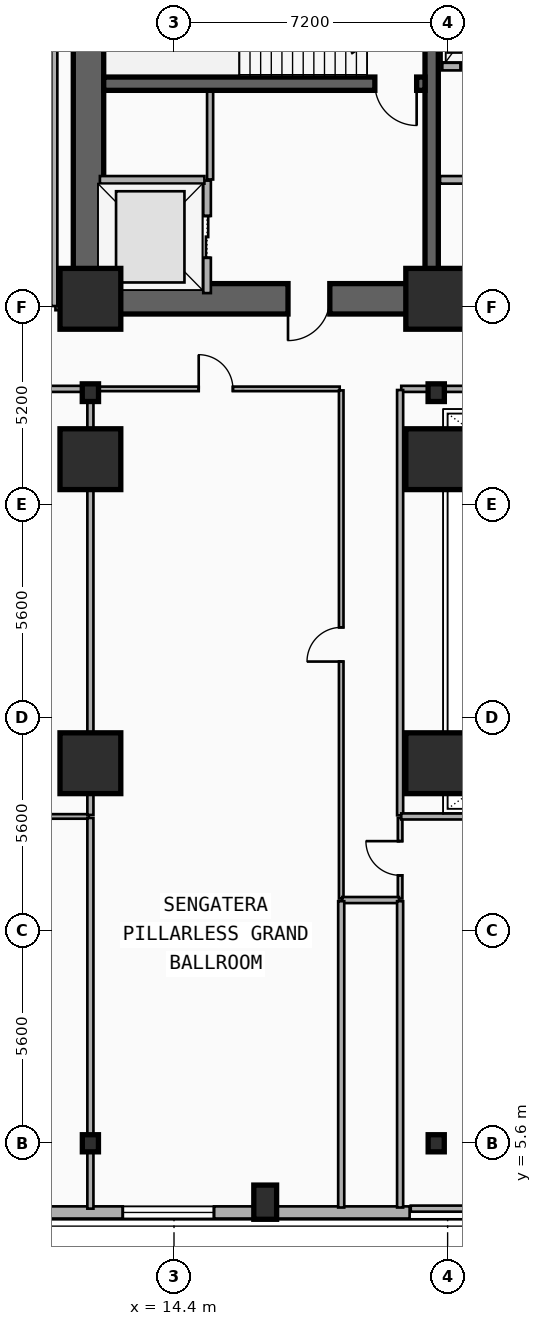
"""IFC4 building model, lengths in metres.
Left out: names, types, materials, properties, quantities, classifications, styles, units other than length and angle.
Written with IfcOpenShell. Run it as: python <this file> out.ifc"""

import sys

from ifc_helpers import new_model, si_unit, direction, frame, frame_2d, origin, origin_2d, place, context, subcontext, project, spatial, rectangle, i_section, extrude, element, fill, save


model = new_model("IFC4")
c1 = context("Model", 3, precision=1e-05, world=origin(), true_north=direction((0.0, 1.0)))
c2 = subcontext(c1, "Body", "Model", "MODEL_VIEW")
j1 = project(units=[si_unit("LENGTHUNIT", "METRE"), si_unit("PLANEANGLEUNIT", "RADIAN")], contexts=[c1])
p1 = place(None, origin())
s1 = spatial("IfcSite", under=j1, at=p1, CompositionType="ELEMENT")
p2 = place(p1, origin())
s2 = spatial("IfcBuilding", under=s1, at=p2, CompositionType="ELEMENT")
p3 = place(p2, frame((0.0, 0.0, 19.4)))
s3 = spatial("IfcBuildingStorey", under=s2, at=p3, CompositionType="ELEMENT", Elevation=19.4)
p4 = place(p3, frame((21.18, 27.82, 0.0), z_axis=(0.0, 0.0, 1.0), x_axis=(-1.0, 0.0, 0.0)))
e1 = element("IfcWall", 1, at=p4, inside=s3, PredefinedType="SHEAR", context=c2, shape_type="SweptSolid", body=[
    extrude(rectangle(XDim=9.03, YDim=0.8, at=frame_2d((4.515, 0.0))), origin(), (0.0, 0.0, 1.0), 4.8),
])
p5 = place(p4, frame((2.68, 0.0, 0.0)))
e2 = element("IfcOpeningElement", 2, at=p5, cuts=e1, PredefinedType="OPENING", context=c2, shape_type="SweptSolid", body=[
    extrude(rectangle(XDim=1.1, YDim=2.15, at=frame_2d((0.55, 1.075))), frame((0.0, 0.41, 0.0), z_axis=(0.0, -1.0, 0.0), x_axis=(1.0, 0.0, 0.0)), (0.0, 0.0, 1.0), 0.82),
])
p6 = place(p3, frame((33.15, 27.82, 0.0), z_axis=(0.0, 0.0, 1.0), x_axis=(-1.0, 0.0, 0.0)))
e3 = element("IfcWall", 3, at=p6, inside=s3, PredefinedType="SHEAR", context=c2, shape_type="SweptSolid", body=[
    extrude(rectangle(XDim=11.97, YDim=0.8, at=frame_2d((5.985, 0.0))), origin(), (0.0, 0.0, 1.0), 4.8),
])
p7 = place(p6, frame((6.1, 0.0, 0.0)))
e4 = element("IfcOpeningElement", 4, at=p7, cuts=e3, PredefinedType="OPENING", context=c2, shape_type="SweptSolid", body=[
    extrude(rectangle(XDim=1.6, YDim=2.2, at=frame_2d((0.8, 1.1))), frame((0.0, 0.41, 0.0), z_axis=(0.0, -1.0, 0.0), x_axis=(1.0, 0.0, 0.0)), (0.0, 0.0, 1.0), 0.82),
])
p8 = place(p3, frame((12.15, 28.22, 0.0), z_axis=(0.0, 0.0, 1.0), x_axis=(0.0, 1.0, 0.0)))
e5 = element("IfcWall", 5, at=p8, inside=s3, PredefinedType="SHEAR", context=c2, shape_type="SweptSolid", body=[
    extrude(rectangle(XDim=8.43, YDim=0.8, at=frame_2d((4.215, 0.0))), origin(), (0.0, 0.0, 1.0), 4.8),
])
p9 = place(p3, frame((21.18, 28.22, 0.0), z_axis=(0.0, 0.0, 1.0), x_axis=(0.0, 1.0, 0.0)))
e6 = element("IfcWall", 6, at=p9, inside=s3, PredefinedType="SHEAR", context=c2, shape_type="SweptSolid", body=[
    extrude(rectangle(XDim=8.43, YDim=0.35, at=frame_2d((4.215, 0.0))), origin(), (0.0, 0.0, 1.0), 4.8),
])
p10 = place(p3, frame((21.005, 33.48, 0.0), z_axis=(0.0, 0.0, 1.0), x_axis=(-1.0, 0.0, 0.0)))
e7 = element("IfcWall", 7, at=p10, inside=s3, PredefinedType="SHEAR", context=c2, shape_type="SweptSolid", body=[
    extrude(rectangle(XDim=8.455, YDim=0.35, at=frame_2d((4.228, 0.0))), origin(), (0.0, 0.0, 1.0), 4.8),
])
p11 = place(p10, frame((0.22, 0.0, 0.0)))
e8 = element("IfcOpeningElement", 8, at=p11, cuts=e7, PredefinedType="OPENING", context=c2, shape_type="SweptSolid", body=[
    extrude(rectangle(XDim=1.1, YDim=2.15, at=frame_2d((0.55, 1.075))), frame((0.0, 0.185, 0.0), z_axis=(0.0, -1.0, 0.0), x_axis=(1.0, 0.0, 0.0)), (0.0, 0.0, 1.0), 0.37),
])
for number, where, z_axis, x_axis in (
    (9, (12.2, 27.82, 0.0), (0.0, 0.0, 1.0), (1.0, 0.0, 0.0)),
    (10, (21.3, 27.82, 0.0), (0.0, 0.0, 1.0), (1.0, 0.0, 0.0)),
):
    element("IfcColumn", number, at=place(p3, frame(where, z_axis=z_axis, x_axis=x_axis)), inside=s3, PredefinedType="COLUMN", context=c2, shape_type="SweptSolid", body=[
        extrude(rectangle(XDim=1.6, YDim=1.6, at=origin_2d()), origin(), (0.0, 0.0, 1.0), 4.8),
    ])
for number, where, z_axis, x_axis in (
    (11, (12.2, 25.35, 0.0), (0.0, 0.0, 1.0), (1.0, 0.0, 0.0)),
    (12, (21.3, 25.35, 0.0), (0.0, 0.0, 1.0), (1.0, 0.0, 0.0)),
):
    element("IfcColumn", number, at=place(p3, frame(where, z_axis=z_axis, x_axis=x_axis)), inside=s3, PredefinedType="COLUMN", context=c2, shape_type="SweptSolid", body=[
        extrude(i_section(OverallWidth=0.428, OverallDepth=0.465, WebThickness=0.045, FlangeThickness=0.073, FilletRadius=0.015, at=origin_2d()), origin(), (0.0, 0.0, 1.0), 4.8),
    ])
p12 = place(p3, frame((12.2, 5.6, 0.0), z_axis=(0.0, 0.0, 1.0), x_axis=(1.0, 0.0, 0.0)))
e13 = element("IfcColumn", 13, at=p12, inside=s3, PredefinedType="COLUMN", context=c2, shape_type="SweptSolid", body=[
    extrude(i_section(OverallWidth=0.424, OverallDepth=0.45, WebThickness=0.041, FlangeThickness=0.065, FilletRadius=0.015, at=origin_2d()), origin(), (0.0, 0.0, 1.0), 4.8),
])
for number, where, z_axis, x_axis in (
    (14, (12.2, 15.6, 0.0), (0.0, 0.0, 1.0), (1.0, 0.0, 0.0)),
    (15, (12.2, 23.6, 0.0), (0.0, 0.0, 1.0), (1.0, 0.0, 0.0)),
):
    element("IfcColumn", number, at=place(p3, frame(where, z_axis=z_axis, x_axis=x_axis)), inside=s3, PredefinedType="COLUMN", context=c2, shape_type="SweptSolid", body=[
        extrude(rectangle(XDim=1.6, YDim=1.6, at=origin_2d()), origin(), (0.0, 0.0, 1.0), 4.8),
    ])
p13 = place(p3, frame((21.3, 5.6, 0.0), z_axis=(0.0, 0.0, 1.0), x_axis=(1.0, 0.0, 0.0)))
e16 = element("IfcColumn", 16, at=p13, inside=s3, PredefinedType="COLUMN", context=c2, shape_type="SweptSolid", body=[
    extrude(i_section(OverallWidth=0.424, OverallDepth=0.45, WebThickness=0.041, FlangeThickness=0.065, FilletRadius=0.015, at=origin_2d()), origin(), (0.0, 0.0, 1.0), 4.8),
])
for number, where, z_axis, x_axis in (
    (17, (21.3, 15.6, 0.0), (0.0, 0.0, 1.0), (1.0, 0.0, 0.0)),
    (18, (21.3, 23.6, 0.0), (0.0, 0.0, 1.0), (1.0, 0.0, 0.0)),
):
    element("IfcColumn", number, at=place(p3, frame(where, z_axis=z_axis, x_axis=x_axis)), inside=s3, PredefinedType="COLUMN", context=c2, shape_type="SweptSolid", body=[
        extrude(rectangle(XDim=1.6, YDim=1.6, at=origin_2d()), origin(), (0.0, 0.0, 1.0), 4.8),
    ])
p14 = place(p3, frame((16.8, 4.05, 0.0), z_axis=(0.0, 0.0, 1.0), x_axis=(1.0, 0.0, 0.0)))
e19 = element("IfcColumn", 19, at=p14, inside=s3, PredefinedType="PILASTER", context=c2, shape_type="SweptSolid", body=[
    extrude(rectangle(XDim=0.6, YDim=0.9, at=origin_2d()), origin(), (0.0, 0.0, 1.0), 4.8),
])
p15 = place(p3, frame((20.6, 3.78, 0.0), z_axis=(0.0, 0.0, 1.0), x_axis=(-1.0, 0.0, 0.0)))
e20 = element("IfcWall", 20, at=p15, inside=s3, PredefinedType="SOLIDWALL", context=c2, shape_type="SweptSolid", body=[
    extrude(rectangle(XDim=17.0, YDim=0.32, at=frame_2d((8.5, 0.0))), origin(), (0.0, 0.0, 1.0), 4.5),
])
p16 = place(p15, frame((13.338, 0.0, 0.9)))
e21 = element("IfcOpeningElement", 21, at=p16, cuts=e20, PredefinedType="OPENING", context=c2, shape_type="SweptSolid", body=[
    extrude(rectangle(XDim=2.4, YDim=1.8, at=frame_2d((1.2, 0.9))), frame((0.0, 0.17, 0.0), z_axis=(0.0, -1.0, 0.0), x_axis=(1.0, 0.0, 0.0)), (0.0, 0.0, 1.0), 0.34),
])
p17 = place(p15, frame((5.148, 0.0, 0.9)))
e22 = element("IfcOpeningElement", 22, at=p17, cuts=e20, PredefinedType="OPENING", context=c2, shape_type="SweptSolid", body=[
    extrude(rectangle(XDim=2.4, YDim=1.8, at=frame_2d((1.2, 0.9))), frame((0.0, 0.17, 0.0), z_axis=(0.0, -1.0, 0.0), x_axis=(1.0, 0.0, 0.0)), (0.0, 0.0, 1.0), 0.34),
])
p18 = place(p3, frame((15.27, 27.97, 0.0), z_axis=(0.0, 0.0, 1.0), x_axis=(0.0, 1.0, 0.0)))
e23 = element("IfcWall", 23, at=p18, inside=s3, PredefinedType="PARTITIONING", context=c2, shape_type="SweptSolid", body=[
    extrude(rectangle(XDim=2.96, YDim=0.2, at=frame_2d((1.48, 0.0))), origin(), (0.0, 0.0, 1.0), 3.472),
])
p19 = place(p18, frame((0.93, 0.0, 0.0)))
e24 = element("IfcOpeningElement", 24, at=p19, cuts=e23, PredefinedType="OPENING", context=c2, shape_type="SweptSolid", body=[
    extrude(rectangle(XDim=1.1, YDim=2.15, at=frame_2d((0.55, 1.075))), frame((0.0, 0.11, 0.0), z_axis=(0.0, -1.0, 0.0), x_axis=(1.0, 0.0, 0.0)), (0.0, 0.0, 1.0), 0.22),
])
p20 = place(p3, frame((12.45, 30.95, 0.0), z_axis=(0.0, 0.0, 1.0), x_axis=(1.0, 0.0, 0.0)))
e25 = element("IfcWall", 25, at=p20, inside=s3, PredefinedType="PARTITIONING", context=c2, shape_type="SweptSolid", body=[
    extrude(rectangle(XDim=2.75, YDim=0.2, at=frame_2d((1.375, 0.0))), origin(), (0.0, 0.0, 1.0), 3.472),
])
p21 = place(p3, frame((21.46, 33.93, 0.0), z_axis=(0.0, 0.0, 1.0), x_axis=(1.0, 0.0, 0.0)))
e26 = element("IfcWall", 26, at=p21, inside=s3, PredefinedType="PARTITIONING", context=c2, shape_type="SweptSolid", body=[
    extrude(rectangle(XDim=2.065, YDim=0.2, at=frame_2d((1.032, 0.0))), origin(), (0.0, 0.0, 1.0), 3.472),
])
p22 = place(p21, frame((0.482, 0.0, 0.0)))
e27 = element("IfcOpeningElement", 27, at=p22, cuts=e26, PredefinedType="OPENING", context=c2, shape_type="SweptSolid", body=[
    extrude(rectangle(XDim=1.1, YDim=2.15, at=frame_2d((0.55, 1.075))), frame((0.0, 0.11, 0.0), z_axis=(0.0, -1.0, 0.0), x_axis=(1.0, 0.0, 0.0)), (0.0, 0.0, 1.0), 0.22),
])
p23 = place(p3, frame((21.4, 30.95, 0.0), z_axis=(0.0, 0.0, 1.0), x_axis=(1.0, 0.0, 0.0)))
e28 = element("IfcWall", 28, at=p23, inside=s3, PredefinedType="PARTITIONING", context=c2, shape_type="SweptSolid", body=[
    extrude(rectangle(XDim=3.46, YDim=0.2, at=frame_2d((1.73, 0.0))), origin(), (0.0, 0.0, 1.0), 3.472),
])
p24 = place(p23, frame((1.13, 0.0, 0.0)))
e29 = element("IfcOpeningElement", 29, at=p24, cuts=e28, PredefinedType="OPENING", context=c2, shape_type="SweptSolid", body=[
    extrude(rectangle(XDim=1.2, YDim=2.15, at=frame_2d((0.6, 1.075))), frame((0.0, 0.11, 0.0), z_axis=(0.0, -1.0, 0.0), x_axis=(1.0, 0.0, 0.0)), (0.0, 0.0, 1.0), 0.22),
])
p25 = place(p3, frame((0.28, 25.45, 0.0), z_axis=(0.0, 0.0, 1.0), x_axis=(1.0, 0.0, 0.0)))
e30 = element("IfcWall", 30, at=p25, inside=s3, PredefinedType="PARTITIONING", context=c2, shape_type="SweptSolid", body=[
    extrude(rectangle(XDim=11.88, YDim=0.16, at=frame_2d((5.94, 0.0))), origin(), (0.0, 0.0, 1.0), 3.666),
])
p26 = place(p25, frame((0.557, 0.0, 0.0)))
e31 = element("IfcOpeningElement", 31, at=p26, cuts=e30, PredefinedType="OPENING", context=c2, shape_type="SweptSolid", body=[
    extrude(rectangle(XDim=1.6, YDim=2.2, at=frame_2d((0.8, 1.1))), frame((0.0, 0.09, 0.0), z_axis=(0.0, -1.0, 0.0), x_axis=(1.0, 0.0, 0.0)), (0.0, 0.0, 1.0), 0.18),
])
p27 = place(p3, frame((12.24, 25.45, 0.0), z_axis=(0.0, 0.0, 1.0), x_axis=(1.0, 0.0, 0.0)))
e32 = element("IfcWall", 32, at=p27, inside=s3, PredefinedType="PARTITIONING", context=c2, shape_type="SweptSolid", body=[
    extrude(rectangle(XDim=6.52, YDim=0.12, at=frame_2d((3.26, 0.0))), origin(), (0.0, 0.0, 1.0), 3.666),
])
p28 = place(p27, frame((2.81, 0.0, 0.0)))
e33 = element("IfcOpeningElement", 33, at=p28, cuts=e32, PredefinedType="OPENING", context=c2, shape_type="SweptSolid", body=[
    extrude(rectangle(XDim=0.9, YDim=2.1, at=frame_2d((0.45, 1.05))), frame((0.0, 0.07, 0.0), z_axis=(0.0, -1.0, 0.0), x_axis=(1.0, 0.0, 0.0)), (0.0, 0.0, 1.0), 0.14),
])
p29 = place(p3, frame((18.8, 12.04, 0.0), z_axis=(0.0, 0.0, 1.0), x_axis=(0.0, 1.0, 0.0)))
e34 = element("IfcWall", 34, at=p29, inside=s3, PredefinedType="PARTITIONING", context=c2, shape_type="SweptSolid", body=[
    extrude(rectangle(XDim=13.37, YDim=0.12, at=frame_2d((6.685, 0.0))), origin(), (0.0, 0.0, 1.0), 3.472),
])
p30 = place(p29, frame((6.235, 0.0, 0.0)))
e35 = element("IfcOpeningElement", 35, at=p30, cuts=e34, PredefinedType="OPENING", context=c2, shape_type="SweptSolid", body=[
    extrude(rectangle(XDim=0.9, YDim=2.1, at=frame_2d((0.45, 1.05))), frame((0.0, 0.07, 0.0), z_axis=(0.0, -1.0, 0.0), x_axis=(1.0, 0.0, 0.0)), (0.0, 0.0, 1.0), 0.14),
])
p31 = place(p3, frame((20.35, 12.04, 0.0), z_axis=(0.0, 0.0, 1.0), x_axis=(0.0, 1.0, 0.0)))
e36 = element("IfcWall", 36, at=p31, inside=s3, PredefinedType="PARTITIONING", context=c2, shape_type="SweptSolid", body=[
    extrude(rectangle(XDim=2.12, YDim=0.12, at=frame_2d((1.06, 0.0))), origin(), (0.0, 0.0, 1.0), 4.12),
])
p32 = place(p31, frame((0.61, 0.0, 0.0)))
e37 = element("IfcOpeningElement", 37, at=p32, cuts=e36, PredefinedType="OPENING", context=c2, shape_type="SweptSolid", body=[
    extrude(rectangle(XDim=0.9, YDim=2.1, at=frame_2d((0.45, 1.05))), frame((0.0, 0.07, 0.0), z_axis=(0.0, -1.0, 0.0), x_axis=(1.0, 0.0, 0.0)), (0.0, 0.0, 1.0), 0.14),
])
p33 = place(p3, frame((0.28, 14.2, 0.0), z_axis=(0.0, 0.0, 1.0), x_axis=(1.0, 0.0, 0.0)))
e38 = element("IfcWall", 38, at=p33, inside=s3, PredefinedType="PARTITIONING", context=c2, shape_type="SweptSolid", body=[
    extrude(rectangle(XDim=11.88, YDim=0.12, at=frame_2d((5.94, 0.0))), origin(), (0.0, 0.0, 1.0), 3.666),
])
p34 = place(p33, frame((5.49, 0.0, 0.0)))
e39 = element("IfcOpeningElement", 39, at=p34, cuts=e38, PredefinedType="OPENING", context=c2, shape_type="SweptSolid", body=[
    extrude(rectangle(XDim=0.9, YDim=2.1, at=frame_2d((0.45, 1.05))), frame((0.0, 0.07, 0.0), z_axis=(0.0, -1.0, 0.0), x_axis=(1.0, 0.0, 0.0)), (0.0, 0.0, 1.0), 0.14),
])
p35 = place(p3, frame((12.2, 3.88, 0.0), z_axis=(0.0, 0.0, 1.0), x_axis=(0.0, 1.0, 0.0)))
e40 = element("IfcWall", 40, at=p35, inside=s3, PredefinedType="PARTITIONING", context=c2, shape_type="SweptSolid", body=[
    extrude(rectangle(XDim=10.28, YDim=0.16, at=frame_2d((5.14, 0.0))), origin(), (0.0, 0.0, 1.0), 3.666),
])
p36 = place(p3, frame((12.2, 14.24, 0.0), z_axis=(0.0, 0.0, 1.0), x_axis=(0.0, 1.0, 0.0)))
e41 = element("IfcWall", 41, at=p36, inside=s3, PredefinedType="PARTITIONING", context=c2, shape_type="SweptSolid", body=[
    extrude(rectangle(XDim=11.17, YDim=0.16, at=frame_2d((5.585, 0.0))), origin(), (0.0, 0.0, 1.0), 3.472),
])
p37 = place(p3, frame((15.35, 30.96, 0.0), z_axis=(0.0, 0.0, 1.0), x_axis=(0.0, 1.0, 0.0)))
e42 = element("IfcWall", 42, at=p37, inside=s3, PredefinedType="PARTITIONING", context=c2, shape_type="SweptSolid", body=[
    extrude(rectangle(XDim=2.31, YDim=0.16, at=frame_2d((1.155, 0.0))), origin(), (0.0, 0.0, 1.0), 4.5),
])
p38 = place(p3, frame((20.38, 25.45, 0.0), z_axis=(0.0, 0.0, 1.0), x_axis=(1.0, 0.0, 0.0)))
e43 = element("IfcWall", 43, at=p38, inside=s3, PredefinedType="PARTITIONING", context=c2, shape_type="SweptSolid", body=[
    extrude(rectangle(XDim=15.94, YDim=0.16, at=frame_2d((7.97, 0.0))), origin(), (0.0, 0.0, 1.0), 3.666),
])
p39 = place(p3, frame((11.28, 27.6, 0.0), z_axis=(0.0, 0.0, 1.0), x_axis=(1.0, 0.0, 0.0)))
e44 = element("IfcWall", 44, at=p39, inside=s3, PredefinedType="PARTITIONING", context=c2, shape_type="SweptSolid", body=[
    extrude(rectangle(XDim=0.84, YDim=0.16, at=frame_2d((0.42, 0.0))), origin(), (0.0, 0.0, 1.0), 3.472),
])
p40 = place(p3, frame((11.25, 27.63, 0.0), z_axis=(0.0, 0.0, 1.0), x_axis=(0.0, 1.0, 0.0)))
e45 = element("IfcWall", 45, at=p40, inside=s3, PredefinedType="PARTITIONING", context=c2, shape_type="SweptSolid", body=[
    extrude(rectangle(XDim=10.29, YDim=0.16, at=frame_2d((5.145, 0.0))), origin(), (0.0, 0.0, 1.0), 4.5),
])
p41 = place(p3, frame((18.83, 12.0, 0.0), z_axis=(0.0, 0.0, 1.0), x_axis=(1.0, 0.0, 0.0)))
e46 = element("IfcWall", 46, at=p41, inside=s3, PredefinedType="PARTITIONING", context=c2, shape_type="SweptSolid", body=[
    extrude(rectangle(XDim=1.49, YDim=0.16, at=frame_2d((0.745, 0.0))), origin(), (0.0, 0.0, 1.0), 4.12),
])
p42 = place(p3, frame((20.35, 14.23, 0.0), z_axis=(0.0, 0.0, 1.0), x_axis=(0.0, 1.0, 0.0)))
e47 = element("IfcWall", 47, at=p42, inside=s3, PredefinedType="PARTITIONING", context=c2, shape_type="SweptSolid", body=[
    extrude(rectangle(XDim=11.19, YDim=0.16, at=frame_2d((5.595, 0.0))), origin(), (0.0, 0.0, 1.0), 3.472),
])
p43 = place(p3, frame((18.8, 3.91, 0.0), z_axis=(0.0, 0.0, 1.0), x_axis=(0.0, 1.0, 0.0)))
e48 = element("IfcWall", 48, at=p43, inside=s3, PredefinedType="PARTITIONING", context=c2, shape_type="SweptSolid", body=[
    extrude(rectangle(XDim=8.06, YDim=0.16, at=frame_2d((4.03, 0.0))), origin(), (0.0, 0.0, 1.0), 3.83),
])
p44 = place(p3, frame((20.63, 3.88, 0.0), z_axis=(0.0, 0.0, 1.0), x_axis=(1.0, 0.0, 0.0)))
e49 = element("IfcWall", 49, at=p44, inside=s3, PredefinedType="PARTITIONING", context=c2, shape_type="SweptSolid", body=[
    extrude(rectangle(XDim=1.44, YDim=0.16, at=frame_2d((0.72, 0.0))), origin(), (0.0, 0.0, 1.0), 4.5),
])
p45 = place(p3, frame((20.38, 14.2, 0.0), z_axis=(0.0, 0.0, 1.0), x_axis=(1.0, 0.0, 0.0)))
e50 = element("IfcWall", 50, at=p45, inside=s3, PredefinedType="PARTITIONING", context=c2, shape_type="SweptSolid", body=[
    extrude(rectangle(XDim=15.94, YDim=0.16, at=frame_2d((7.97, 0.0))), origin(), (0.0, 0.0, 1.0), 3.666),
])
p46 = place(p3, frame((20.35, 3.91, 0.0), z_axis=(0.0, 0.0, 1.0), x_axis=(0.0, 1.0, 0.0)))
e51 = element("IfcWall", 51, at=p46, inside=s3, PredefinedType="PARTITIONING", context=c2, shape_type="SweptSolid", body=[
    extrude(rectangle(XDim=8.06, YDim=0.16, at=frame_2d((4.03, 0.0))), origin(), (0.0, 0.0, 1.0), 3.83),
])
p47 = place(p17, origin())
e52 = element("IfcWindow", 52, at=p47, inside=s3, PartitioningType="SINGLE_PANEL", PredefinedType="WINDOW", context=c2, shape_type="SweptSolid", body=[
    extrude(rectangle(XDim=2.4, YDim=1.8, at=frame_2d((1.2, 0.9))), frame((0.0, 0.03, 0.0), z_axis=(0.0, -1.0, 0.0), x_axis=(1.0, 0.0, 0.0)), (0.0, 0.0, 1.0), 0.06),
])
fill(e22, e52)
p48 = place(p19, origin())
e53 = element("IfcDoor", 53, at=p48, inside=s3, OperationType="DOUBLE_DOOR_SLIDING", PredefinedType="DOOR", context=c2, shape_type="SweptSolid", body=[
    extrude(rectangle(XDim=1.1, YDim=2.15, at=frame_2d((0.55, 1.075))), frame((0.0, 0.025, 0.0), z_axis=(0.0, -1.0, 0.0), x_axis=(1.0, 0.0, 0.0)), (0.0, 0.0, 1.0), 0.05),
])
fill(e24, e53)
p49 = place(p22, origin())
e54 = element("IfcDoor", 54, at=p49, inside=s3, OperationType="DOUBLE_DOOR_SLIDING", PredefinedType="DOOR", context=c2, shape_type="SweptSolid", body=[
    extrude(rectangle(XDim=1.1, YDim=2.15, at=frame_2d((0.55, 1.075))), frame((0.0, 0.025, 0.0), z_axis=(0.0, -1.0, 0.0), x_axis=(1.0, 0.0, 0.0)), (0.0, 0.0, 1.0), 0.05),
])
fill(e27, e54)
p50 = place(p11, origin())
e55 = element("IfcDoor", 55, at=p50, inside=s3, OperationType="SINGLE_SWING_LEFT", PredefinedType="DOOR", context=c2, shape_type="SweptSolid", body=[
    extrude(rectangle(XDim=1.1, YDim=2.15, at=frame_2d((0.55, 1.075))), frame((0.0, 0.025, 0.0), z_axis=(0.0, -1.0, 0.0), x_axis=(1.0, 0.0, 0.0)), (0.0, 0.0, 1.0), 0.05),
])
fill(e8, e55)
p51 = place(p5, origin())
e56 = element("IfcDoor", 56, at=p51, inside=s3, OperationType="SINGLE_SWING_RIGHT", PredefinedType="DOOR", context=c2, shape_type="SweptSolid", body=[
    extrude(rectangle(XDim=1.1, YDim=2.15, at=frame_2d((0.55, 1.075))), frame((0.0, 0.025, 0.0), z_axis=(0.0, -1.0, 0.0), x_axis=(1.0, 0.0, 0.0)), (0.0, 0.0, 1.0), 0.05),
])
fill(e2, e56)
p52 = place(p28, origin())
e57 = element("IfcDoor", 57, at=p52, inside=s3, OperationType="SINGLE_SWING_LEFT", PredefinedType="DOOR", context=c2, shape_type="SweptSolid", body=[
    extrude(rectangle(XDim=0.9, YDim=2.1, at=frame_2d((0.45, 1.05))), frame((0.0, 0.025, 0.0), z_axis=(0.0, -1.0, 0.0), x_axis=(1.0, 0.0, 0.0)), (0.0, 0.0, 1.0), 0.05),
])
fill(e33, e57)
p53 = place(p30, origin())
e58 = element("IfcDoor", 58, at=p53, inside=s3, OperationType="SINGLE_SWING_LEFT", PredefinedType="DOOR", context=c2, shape_type="SweptSolid", body=[
    extrude(rectangle(XDim=0.9, YDim=2.1, at=frame_2d((0.45, 1.05))), frame((0.0, 0.025, 0.0), z_axis=(0.0, -1.0, 0.0), x_axis=(1.0, 0.0, 0.0)), (0.0, 0.0, 1.0), 0.05),
])
fill(e35, e58)
p54 = place(p32, origin())
e59 = element("IfcDoor", 59, at=p54, inside=s3, OperationType="SINGLE_SWING_RIGHT", PredefinedType="DOOR", context=c2, shape_type="SweptSolid", body=[
    extrude(rectangle(XDim=0.9, YDim=2.1, at=frame_2d((0.45, 1.05))), frame((0.0, 0.025, 0.0), z_axis=(0.0, -1.0, 0.0), x_axis=(1.0, 0.0, 0.0)), (0.0, 0.0, 1.0), 0.05),
])
fill(e37, e59)
save(model, sys.argv[1])
